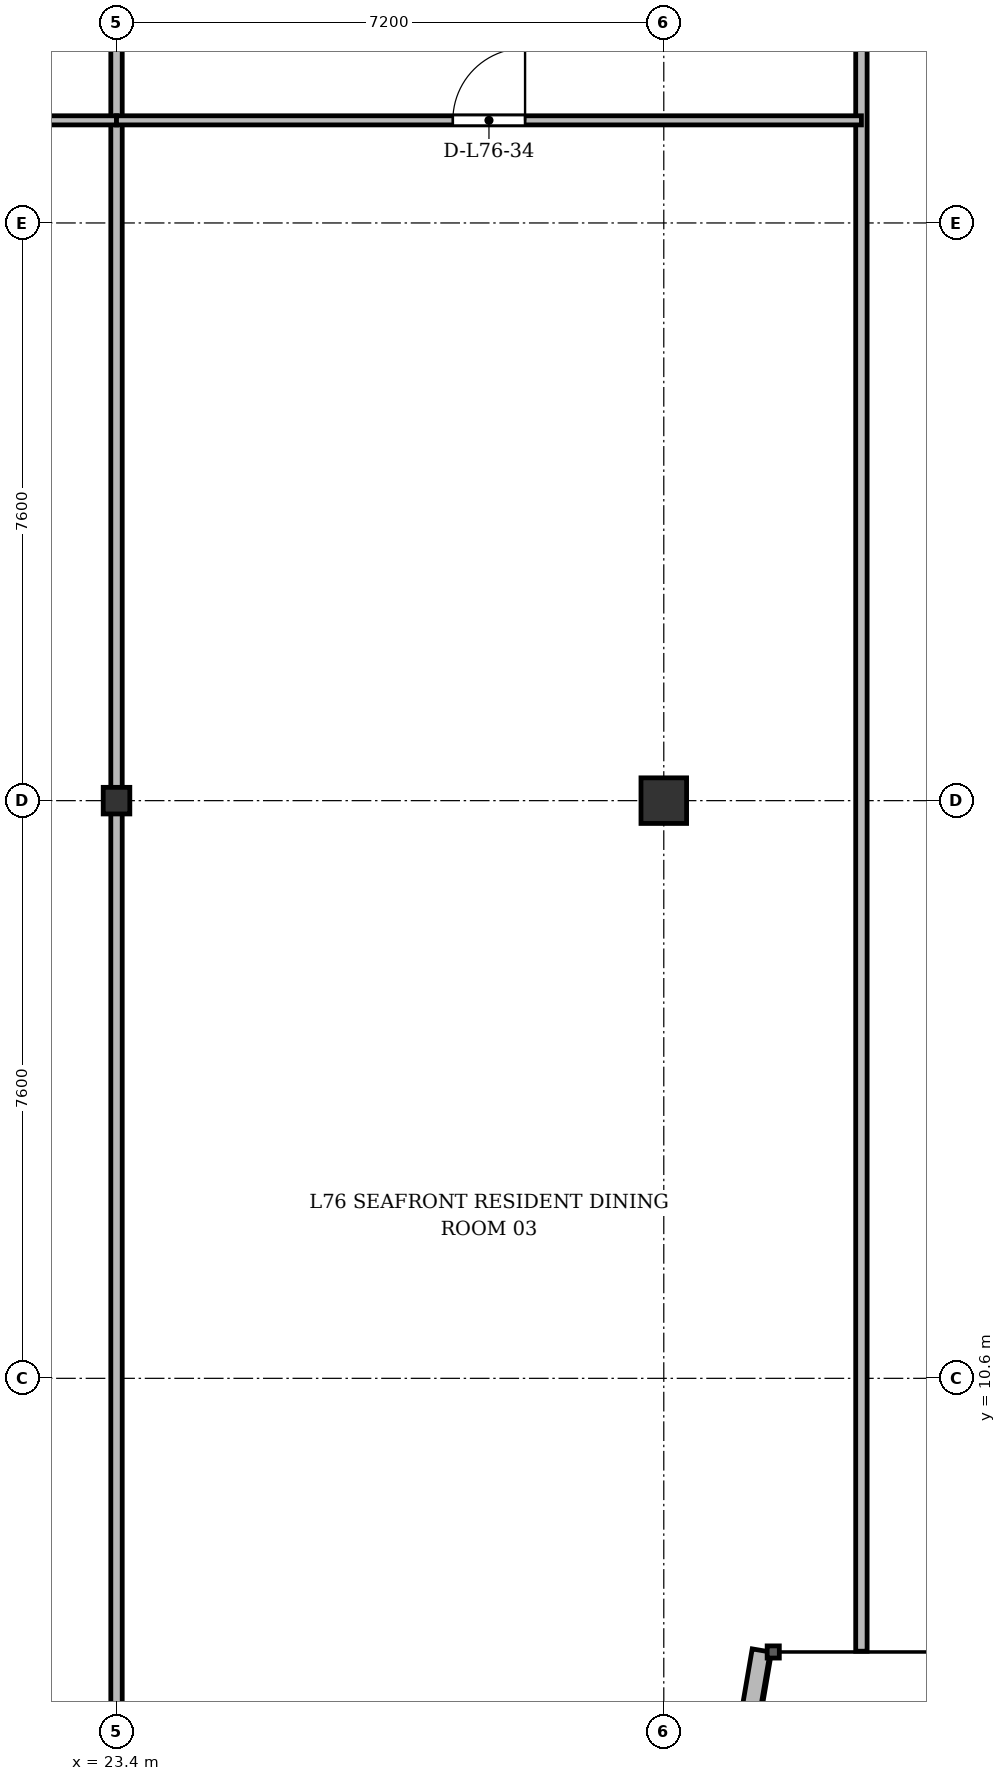
"""IFC4 building model, lengths in metres.
Left out: names, types, materials, properties, quantities, classifications, styles, units other than length and angle.
Written with IfcOpenShell. Run it as: python <this file> out.ifc"""

import sys

from ifc_helpers import new_model, si_unit, direction, frame, frame_2d, origin, origin_2d, place, context, subcontext, project, spatial, rectangle, i_section, extrude, source, transform, mapped, element, fill, save


model = new_model("IFC4")
c1 = context("Model", 3, precision=1e-05, world=origin(), true_north=direction((0.0, 1.0)))
c2 = subcontext(c1, "Body", "Model", "MODEL_VIEW")
j1 = project(units=[si_unit("LENGTHUNIT", "METRE"), si_unit("PLANEANGLEUNIT", "RADIAN")], contexts=[c1])
p1 = place(None, origin())
s1 = spatial("IfcSite", under=j1, at=p1, CompositionType="ELEMENT")
p2 = place(p1, origin())
s2 = spatial("IfcBuilding", under=s1, at=p2, CompositionType="ELEMENT")
p3 = place(p2, frame((0.0, 0.0, 291.9)))
s3 = spatial("IfcBuildingStorey", under=s2, at=p3, CompositionType="ELEMENT", Elevation=291.9)
m1 = source(origin(), c2, "Body", "SweptSolid", [
    extrude(i_section(OverallWidth=0.35, OverallDepth=0.35, WebThickness=0.018, FlangeThickness=0.028, at=origin_2d()), origin(), (0.0, 0.0, 1.0), 3.6),
])
p4 = place(p3, frame((23.4, 18.2, 0.0), z_axis=(0.0, 0.0, 1.0), x_axis=(1.0, 0.0, 0.0)))
e1 = element("IfcColumn", 1, at=p4, inside=s3, PredefinedType="COLUMN", context=c2, shape_type="MappedRepresentation", body=[
    mapped(m1, transform((0.0, 0.0, 0.0), x_axis=(1.0, 0.0, 0.0), y_axis=(0.0, 1.0, 0.0), z_axis=(0.0, 0.0, 1.0), scale=1.0)),
])
m2 = source(origin(), c2, "Body", "SweptSolid", [
    extrude(rectangle(XDim=0.6, YDim=0.6, at=origin_2d()), origin(), (0.0, 0.0, 1.0), 3.6),
])
p5 = place(p3, frame((30.6, 18.2, 0.0), z_axis=(0.0, 0.0, 1.0), x_axis=(1.0, 0.0, 0.0)))
e2 = element("IfcColumn", 2, at=p5, inside=s3, PredefinedType="COLUMN", context=c2, shape_type="MappedRepresentation", body=[
    mapped(m2, transform((0.0, 0.0, 0.0), x_axis=(1.0, 0.0, 0.0), y_axis=(0.0, 1.0, 0.0), z_axis=(0.0, 0.0, 1.0), scale=1.0)),
])
p6 = place(p3, frame((31.882, 7.02, 0.0), z_axis=(0.0, 0.0, 1.0), x_axis=(-0.168923741424, -0.98562912375, 0.0)))
e3 = element("IfcWall", 3, at=p6, inside=s3, PredefinedType="SOLIDWALL", context=c2, shape_type="SweptSolid", body=[
    extrude(rectangle(XDim=3.551, YDim=0.24, at=frame_2d((1.775, 0.0))), origin(), (0.0, 0.0, 1.0), 2.73),
])
p7 = place(p3, frame((23.4, 3.725, 0.0), z_axis=(0.0, 0.0, 1.0), x_axis=(0.0, 1.0, 0.0)))
e4 = element("IfcWall", 4, at=p7, inside=s3, PredefinedType="PARTITIONING", context=c2, shape_type="SweptSolid", body=[
    extrude(rectangle(XDim=27.275, YDim=0.15, at=frame_2d((13.637, 0.0))), origin(), (0.0, 0.0, 1.0), 2.68),
])
p8 = place(p3, frame((33.2, 7.01, 0.0), z_axis=(0.0, 0.0, 1.0), x_axis=(0.0, 1.0, 0.0)))
e5 = element("IfcWall", 5, at=p8, inside=s3, PredefinedType="PARTITIONING", context=c2, shape_type="SweptSolid", body=[
    extrude(rectangle(XDim=23.99, YDim=0.15, at=frame_2d((11.995, 0.0))), origin(), (0.0, 0.0, 1.0), 2.73),
])
p9 = place(p3, frame((15.6, 27.15, 0.0), z_axis=(0.0, 0.0, 1.0), x_axis=(1.0, 0.0, 0.0)))
e6 = element("IfcWall", 6, at=p9, inside=s3, PredefinedType="PARTITIONING", context=c2, shape_type="SweptSolid", body=[
    extrude(rectangle(XDim=7.8, YDim=0.12, at=frame_2d((3.9, 0.0))), origin(), (0.0, 0.0, 1.0), 2.68),
])
p10 = place(p9, frame((3.333, 0.0, 0.0)))
e7 = element("IfcOpeningElement", 7, at=p10, cuts=e6, PredefinedType="OPENING", context=c2, shape_type="SweptSolid", body=[
    extrude(rectangle(XDim=0.95, YDim=2.15, at=frame_2d((0.475, 1.075))), frame((0.0, 0.07, 0.0), z_axis=(0.0, -1.0, 0.0), x_axis=(1.0, 0.0, 0.0)), (0.0, 0.0, 1.0), 0.14),
])
p11 = place(p3, frame((23.4, 27.15, 0.0), z_axis=(0.0, 0.0, 1.0), x_axis=(1.0, 0.0, 0.0)))
e8 = element("IfcWall", 8, at=p11, inside=s3, PredefinedType="PARTITIONING", context=c2, shape_type="SweptSolid", body=[
    extrude(rectangle(XDim=9.8, YDim=0.12, at=frame_2d((4.9, 0.0))), origin(), (0.0, 0.0, 1.0), 2.68),
])
p12 = place(p11, frame((4.425, 0.0, 0.0)))
e9 = element("IfcOpeningElement", 9, at=p12, cuts=e8, PredefinedType="OPENING", context=c2, shape_type="SweptSolid", body=[
    extrude(rectangle(XDim=0.95, YDim=2.15, at=frame_2d((0.475, 1.075))), frame((0.0, 0.07, 0.0), z_axis=(0.0, -1.0, 0.0), x_axis=(1.0, 0.0, 0.0)), (0.0, 0.0, 1.0), 0.14),
])
m3 = source(origin(), c2, "Body", "SweptSolid", [
    extrude(rectangle(XDim=0.95, YDim=2.15, at=frame_2d((0.475, 1.075))), frame((0.0, 0.025, 0.0), z_axis=(0.0, -1.0, 0.0), x_axis=(1.0, 0.0, 0.0)), (0.0, 0.0, 1.0), 0.05),
])
p13 = place(p12, origin())
e10 = element("IfcDoor", 10, at=p13, inside=s3, OperationType="SINGLE_SWING_RIGHT", PredefinedType="DOOR", context=c2, shape_type="MappedRepresentation", body=[
    mapped(m3, transform((0.0, 0.0, 0.0), x_axis=(1.0, 0.0, 0.0), y_axis=(0.0, 1.0, 0.0), z_axis=(0.0, 0.0, 1.0), scale=1.0)),
])
fill(e9, e10)
save(model, sys.argv[1])
